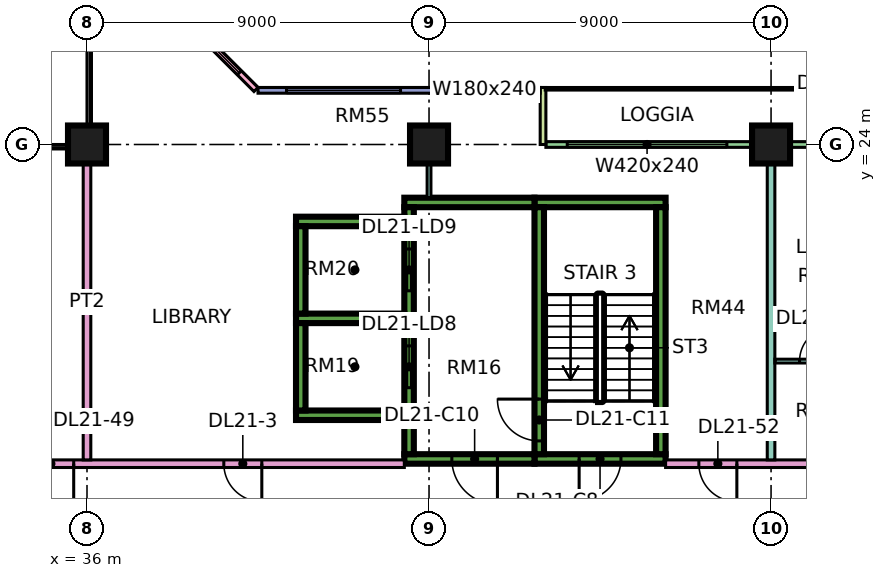
"""IFC4 building model, lengths in metres.
Left out: names, types, materials, properties, quantities, classifications, styles, units other than length and angle.
Written with IfcOpenShell. Run it as: python <this file> out.ifc"""

import sys

from ifc_helpers import new_model, si_unit, direction, frame, frame_2d, origin, origin_2d, place, context, subcontext, project, spatial, rectangle, extrude, element, fill, save


model = new_model("IFC4")
c1 = context("Model", 3, precision=1e-05, world=origin(), true_north=direction((0.0, 1.0)))
c2 = subcontext(c1, "Body", "Model", "MODEL_VIEW")
j1 = project(units=[si_unit("LENGTHUNIT", "METRE"), si_unit("PLANEANGLEUNIT", "RADIAN")], contexts=[c1])
p1 = place(None, origin())
s1 = spatial("IfcSite", under=j1, at=p1, CompositionType="ELEMENT")
p2 = place(p1, origin())
s2 = spatial("IfcBuilding", under=s1, at=p2, CompositionType="ELEMENT")
p3 = place(p2, frame((0.0, 0.0, 95.65)))
s3 = spatial("IfcBuildingStorey", under=s2, at=p3, CompositionType="ELEMENT", Elevation=95.65)
for number, where, z_axis, x_axis in (
    (1, (36.0, 24.0, 0.0), (0.0, 0.0, 1.0), (1.0, 0.0, 0.0)),
    (2, (45.0, 24.0, 0.0), (0.0, 0.0, 1.0), (1.0, 0.0, 0.0)),
    (3, (54.0, 24.0, 0.0), (0.0, 0.0, 1.0), (1.0, 0.0, 0.0)),
):
    element("IfcColumn", number, at=place(p3, frame(where, z_axis=z_axis, x_axis=x_axis)), inside=s3, PredefinedType="COLUMN", context=c2, shape_type="SweptSolid", body=[
        extrude(rectangle(XDim=1.0, YDim=1.0, at=origin_2d()), origin(), (0.0, 0.0, 1.0), 3.75),
    ])
p4 = place(p3, frame((47.775, 15.725, 0.0), z_axis=(0.0, 0.0, 1.0), x_axis=(1.0, 0.0, 0.0)))
e4 = element("IfcWall", 4, at=p4, inside=s3, PredefinedType="SHEAR", context=c2, shape_type="SweptSolid", body=[
    extrude(rectangle(XDim=3.45, YDim=0.25, at=frame_2d((1.725, 0.0))), origin(), (0.0, 0.0, 1.0), 3.75),
])
p5 = place(p4, frame((1.175, 0.0, 0.0)))
e5 = element("IfcOpeningElement", 5, at=p5, cuts=e4, PredefinedType="OPENING", context=c2, shape_type="SweptSolid", body=[
    extrude(rectangle(XDim=1.1, YDim=2.2, at=frame_2d((0.55, 1.1))), frame((0.0, 0.135, 0.0), z_axis=(0.0, -1.0, 0.0), x_axis=(1.0, 0.0, 0.0)), (0.0, 0.0, 1.0), 0.27),
])
p6 = place(p3, frame((47.775, 22.475, 0.0), z_axis=(0.0, 0.0, 1.0), x_axis=(1.0, 0.0, 0.0)))
e6 = element("IfcWall", 6, at=p6, inside=s3, PredefinedType="SHEAR", context=c2, shape_type="SweptSolid", body=[
    extrude(rectangle(XDim=3.45, YDim=0.25, at=frame_2d((1.725, 0.0))), origin(), (0.0, 0.0, 1.0), 3.75),
])
p7 = place(p3, frame((47.9, 15.85, 0.0), z_axis=(0.0, 0.0, 1.0), x_axis=(0.0, 1.0, 0.0)))
e7 = element("IfcWall", 7, at=p7, inside=s3, PredefinedType="SHEAR", context=c2, shape_type="SweptSolid", body=[
    extrude(rectangle(XDim=6.5, YDim=0.25, at=frame_2d((3.25, 0.0))), origin(), (0.0, 0.0, 1.0), 3.75),
])
p8 = place(p7, frame((0.35, 0.0, 0.0)))
e8 = element("IfcOpeningElement", 8, at=p8, cuts=e7, PredefinedType="OPENING", context=c2, shape_type="SweptSolid", body=[
    extrude(rectangle(XDim=1.1, YDim=2.2, at=frame_2d((0.55, 1.1))), frame((0.0, 0.135, 0.0), z_axis=(0.0, -1.0, 0.0), x_axis=(1.0, 0.0, 0.0)), (0.0, 0.0, 1.0), 0.27),
])
p9 = place(p3, frame((51.1, 15.85, 0.0), z_axis=(0.0, 0.0, 1.0), x_axis=(0.0, 1.0, 0.0)))
e9 = element("IfcWall", 9, at=p9, inside=s3, PredefinedType="SHEAR", context=c2, shape_type="SweptSolid", body=[
    extrude(rectangle(XDim=6.5, YDim=0.25, at=frame_2d((3.25, 0.0))), origin(), (0.0, 0.0, 1.0), 3.75),
])
p10 = place(p3, frame((44.35, 15.725, 0.0), z_axis=(0.0, 0.0, 1.0), x_axis=(1.0, 0.0, 0.0)))
e10 = element("IfcWall", 10, at=p10, inside=s3, PredefinedType="SHEAR", context=c2, shape_type="SweptSolid", body=[
    extrude(rectangle(XDim=3.425, YDim=0.25, at=frame_2d((1.712, 0.0))), origin(), (0.0, 0.0, 1.0), 3.75),
])
p11 = place(p10, frame((1.25, 0.0, 0.0)))
e11 = element("IfcOpeningElement", 11, at=p11, cuts=e10, PredefinedType="OPENING", context=c2, shape_type="SweptSolid", body=[
    extrude(rectangle(XDim=1.2, YDim=2.2, at=frame_2d((0.6, 1.1))), frame((0.0, 0.135, 0.0), z_axis=(0.0, -1.0, 0.0), x_axis=(1.0, 0.0, 0.0)), (0.0, 0.0, 1.0), 0.27),
])
p12 = place(p3, frame((44.35, 22.475, 0.0), z_axis=(0.0, 0.0, 1.0), x_axis=(1.0, 0.0, 0.0)))
e12 = element("IfcWall", 12, at=p12, inside=s3, PredefinedType="SHEAR", context=c2, shape_type="SweptSolid", body=[
    extrude(rectangle(XDim=3.425, YDim=0.25, at=frame_2d((1.712, 0.0))), origin(), (0.0, 0.0, 1.0), 3.75),
])
p13 = place(p3, frame((44.475, 15.85, 0.0), z_axis=(0.0, 0.0, 1.0), x_axis=(0.0, 1.0, 0.0)))
e13 = element("IfcWall", 13, at=p13, inside=s3, PredefinedType="SHEAR", context=c2, shape_type="SweptSolid", body=[
    extrude(rectangle(XDim=6.5, YDim=0.25, at=frame_2d((3.25, 0.0))), origin(), (0.0, 0.0, 1.0), 3.75),
])
p14 = place(p13, frame((1.75, 0.0, 0.0)))
e14 = element("IfcOpeningElement", 14, at=p14, cuts=e13, PredefinedType="OPENING", context=c2, shape_type="SweptSolid", body=[
    extrude(rectangle(XDim=1.1, YDim=2.2, at=frame_2d((0.55, 1.1))), frame((0.0, 0.135, 0.0), z_axis=(0.0, -1.0, 0.0), x_axis=(1.0, 0.0, 0.0)), (0.0, 0.0, 1.0), 0.27),
])
p15 = place(p13, frame((4.3, 0.0, 0.0)))
e15 = element("IfcOpeningElement", 15, at=p15, cuts=e13, PredefinedType="OPENING", context=c2, shape_type="SweptSolid", body=[
    extrude(rectangle(XDim=1.1, YDim=2.2, at=frame_2d((0.55, 1.1))), frame((0.0, 0.135, 0.0), z_axis=(0.0, -1.0, 0.0), x_axis=(1.0, 0.0, 0.0)), (0.0, 0.0, 1.0), 0.27),
])
for number, where, z_axis, x_axis in (
    (16, (41.5, 16.875, 0.0), (0.0, 0.0, 1.0), (1.0, 0.0, 0.0)),
    (17, (41.5, 19.425, 0.0), (0.0, 0.0, 1.0), (1.0, 0.0, 0.0)),
    (18, (41.5, 21.975, 0.0), (0.0, 0.0, 1.0), (1.0, 0.0, 0.0)),
):
    element("IfcWall", number, at=place(p3, frame(where, z_axis=z_axis, x_axis=x_axis)), inside=s3, PredefinedType="SHEAR", context=c2, shape_type="SweptSolid", body=[
        extrude(rectangle(XDim=2.85, YDim=0.25, at=frame_2d((1.425, 0.0))), origin(), (0.0, 0.0, 1.0), 3.75),
    ])
for number, where, z_axis, x_axis in (
    (19, (41.625, 17.0, 0.0), (0.0, 0.0, 1.0), (0.0, 1.0, 0.0)),
    (20, (41.625, 19.55, 0.0), (0.0, 0.0, 1.0), (0.0, 1.0, 0.0)),
):
    element("IfcWall", number, at=place(p3, frame(where, z_axis=z_axis, x_axis=x_axis)), inside=s3, PredefinedType="SHEAR", context=c2, shape_type="SweptSolid", body=[
        extrude(rectangle(XDim=2.3, YDim=0.25, at=frame_2d((1.15, 0.0))), origin(), (0.0, 0.0, 1.0), 3.75),
    ])
p16 = place(p3, frame((59.925, 24.0, 0.0), z_axis=(0.0, 0.0, 1.0), x_axis=(-1.0, 0.0, 0.0)))
e21 = element("IfcWall", 21, at=p16, inside=s3, PredefinedType="SOLIDWALL", context=c2, shape_type="SweptSolid", body=[
    extrude(rectangle(XDim=11.85, YDim=0.15, at=frame_2d((5.925, 0.0))), origin(), (0.0, 0.0, 1.0), 3.35),
])
p17 = place(p16, frame((0.562, 0.0, 0.45)))
e22 = element("IfcOpeningElement", 22, at=p17, cuts=e21, PredefinedType="OPENING", context=c2, shape_type="SweptSolid", body=[
    extrude(rectangle(XDim=1.8, YDim=2.4, at=frame_2d((0.9, 1.2))), frame((0.0, 0.085, 0.0), z_axis=(0.0, -1.0, 0.0), x_axis=(1.0, 0.0, 0.0)), (0.0, 0.0, 1.0), 0.17),
])
p18 = place(p16, frame((3.525, 0.0, 0.0)))
e23 = element("IfcOpeningElement", 23, at=p18, cuts=e21, PredefinedType="OPENING", context=c2, shape_type="SweptSolid", body=[
    extrude(rectangle(XDim=1.2, YDim=2.4, at=frame_2d((0.6, 1.2))), frame((0.0, 0.085, 0.0), z_axis=(0.0, -1.0, 0.0), x_axis=(1.0, 0.0, 0.0)), (0.0, 0.0, 1.0), 0.17),
])
p19 = place(p16, frame((7.087, 0.0, 0.45)))
e24 = element("IfcOpeningElement", 24, at=p19, cuts=e21, PredefinedType="OPENING", context=c2, shape_type="SweptSolid", body=[
    extrude(rectangle(XDim=4.2, YDim=2.4, at=frame_2d((2.1, 1.2))), frame((0.0, 0.085, 0.0), z_axis=(0.0, -1.0, 0.0), x_axis=(1.0, 0.0, 0.0)), (0.0, 0.0, 1.0), 0.17),
])
p20 = place(p3, frame((48.0, 25.5, 0.0), z_axis=(0.0, 0.0, 1.0), x_axis=(0.0, -1.0, 0.0)))
e25 = element("IfcWall", 25, at=p20, inside=s3, PredefinedType="SOLIDWALL", context=c2, shape_type="SweptSolid", body=[
    extrude(rectangle(XDim=1.5, YDim=0.15, at=frame_2d((0.75, 0.0))), origin(), (0.0, 0.0, 1.0), 3.35),
])
p21 = place(p3, frame((47.925, 25.425, 0.0), z_axis=(0.0, 0.0, 1.0), x_axis=(-1.0, 0.0, 0.0)))
e26 = element("IfcWall", 26, at=p21, inside=s3, PredefinedType="SOLIDWALL", context=c2, shape_type="SweptSolid", body=[
    extrude(rectangle(XDim=7.425, YDim=0.15, at=frame_2d((3.712, 0.0))), origin(), (0.0, 0.0, 1.0), 3.35),
])
p22 = place(p21, frame((0.562, 0.0, 0.45)))
e27 = element("IfcOpeningElement", 27, at=p22, cuts=e26, PredefinedType="OPENING", context=c2, shape_type="SweptSolid", body=[
    extrude(rectangle(XDim=1.8, YDim=2.4, at=frame_2d((0.9, 1.2))), frame((0.0, 0.085, 0.0), z_axis=(0.0, -1.0, 0.0), x_axis=(1.0, 0.0, 0.0)), (0.0, 0.0, 1.0), 0.17),
])
p23 = place(p21, frame((3.675, 0.0, 0.45)))
e28 = element("IfcOpeningElement", 28, at=p23, cuts=e26, PredefinedType="OPENING", context=c2, shape_type="SweptSolid", body=[
    extrude(rectangle(XDim=3.0, YDim=2.4, at=frame_2d((1.5, 1.2))), frame((0.0, 0.085, 0.0), z_axis=(0.0, -1.0, 0.0), x_axis=(1.0, 0.0, 0.0)), (0.0, 0.0, 1.0), 0.17),
])
p24 = place(p3, frame((40.447, 25.447, 0.0), z_axis=(0.0, 0.0, 1.0), x_axis=(-0.707106781187, 0.707106781187, 0.0)))
e29 = element("IfcWall", 29, at=p24, inside=s3, PredefinedType="SOLIDWALL", context=c2, shape_type="SweptSolid", body=[
    extrude(rectangle(XDim=4.243, YDim=0.15, at=frame_2d((2.121, 0.0))), origin(), (0.0, 0.0, 1.0), 3.35),
])
p25 = place(p24, frame((0.621, 0.0, 0.45)))
e30 = element("IfcOpeningElement", 30, at=p25, cuts=e29, PredefinedType="OPENING", context=c2, shape_type="SweptSolid", body=[
    extrude(rectangle(XDim=3.0, YDim=2.4, at=frame_2d((1.5, 1.2))), frame((0.0, 0.085, 0.0), z_axis=(0.0, -1.0, 0.0), x_axis=(1.0, 0.0, 0.0)), (0.0, 0.0, 1.0), 0.17),
])
p26 = place(p3, frame((34.0, 15.6, 0.0), z_axis=(0.0, 0.0, 1.0), x_axis=(1.0, 0.0, 0.0)))
e31 = element("IfcWall", 31, at=p26, inside=s3, PredefinedType="PARTITIONING", context=c2, shape_type="SweptSolid", body=[
    extrude(rectangle(XDim=10.35, YDim=0.2, at=frame_2d((5.175, 0.0))), origin(), (0.0, 0.0, 1.0), 3.35),
])
p27 = place(p26, frame((5.6, 0.0, 0.0)))
e32 = element("IfcOpeningElement", 32, at=p27, cuts=e31, PredefinedType="OPENING", context=c2, shape_type="SweptSolid", body=[
    extrude(rectangle(XDim=1.0, YDim=2.1, at=frame_2d((0.5, 1.05))), frame((0.0, 0.11, 0.0), z_axis=(0.0, -1.0, 0.0), x_axis=(1.0, 0.0, 0.0)), (0.0, 0.0, 1.0), 0.22),
])
p28 = place(p26, frame((0.45, 0.0, 0.0)))
e33 = element("IfcOpeningElement", 33, at=p28, cuts=e31, PredefinedType="OPENING", context=c2, shape_type="SweptSolid", body=[
    extrude(rectangle(XDim=1.2, YDim=2.1, at=frame_2d((0.6, 1.05))), frame((0.0, 0.11, 0.0), z_axis=(0.0, -1.0, 0.0), x_axis=(1.0, 0.0, 0.0)), (0.0, 0.0, 1.0), 0.22),
])
p29 = place(p3, frame((36.0, 15.7, 0.0), z_axis=(0.0, 0.0, 1.0), x_axis=(0.0, 1.0, 0.0)))
e34 = element("IfcWall", 34, at=p29, inside=s3, PredefinedType="PARTITIONING", context=c2, shape_type="SweptSolid", body=[
    extrude(rectangle(XDim=8.3, YDim=0.2, at=frame_2d((4.15, 0.0))), origin(), (0.0, 0.0, 1.0), 3.35),
])
p30 = place(p3, frame((45.0, 22.6, 0.0), z_axis=(0.0, 0.0, 1.0), x_axis=(0.0, 1.0, 0.0)))
e35 = element("IfcWall", 35, at=p30, inside=s3, PredefinedType="PARTITIONING", context=c2, shape_type="SweptSolid", body=[
    extrude(rectangle(XDim=1.4, YDim=0.1, at=frame_2d((0.7, 0.0))), origin(), (0.0, 0.0, 1.0), 3.35),
])
p31 = place(p3, frame((51.225, 15.6, 0.0), z_axis=(0.0, 0.0, 1.0), x_axis=(1.0, 0.0, 0.0)))
e36 = element("IfcWall", 36, at=p31, inside=s3, PredefinedType="PARTITIONING", context=c2, shape_type="SweptSolid", body=[
    extrude(rectangle(XDim=22.125, YDim=0.2, at=frame_2d((11.062, 0.0))), origin(), (0.0, 0.0, 1.0), 3.35),
])
p32 = place(p31, frame((6.125, 0.0, 0.0)))
e37 = element("IfcOpeningElement", 37, at=p32, cuts=e36, PredefinedType="OPENING", context=c2, shape_type="SweptSolid", body=[
    extrude(rectangle(XDim=1.0, YDim=2.1, at=frame_2d((0.5, 1.05))), frame((0.0, 0.11, 0.0), z_axis=(0.0, -1.0, 0.0), x_axis=(1.0, 0.0, 0.0)), (0.0, 0.0, 1.0), 0.22),
])
p33 = place(p31, frame((0.875, 0.0, 0.0)))
e38 = element("IfcOpeningElement", 38, at=p33, cuts=e36, PredefinedType="OPENING", context=c2, shape_type="SweptSolid", body=[
    extrude(rectangle(XDim=1.0, YDim=2.1, at=frame_2d((0.5, 1.05))), frame((0.0, 0.11, 0.0), z_axis=(0.0, -1.0, 0.0), x_axis=(1.0, 0.0, 0.0)), (0.0, 0.0, 1.0), 0.22),
])
p34 = place(p3, frame((54.0, 15.7, 0.0), z_axis=(0.0, 0.0, 1.0), x_axis=(0.0, 1.0, 0.0)))
e39 = element("IfcWall", 39, at=p34, inside=s3, PredefinedType="PARTITIONING", context=c2, shape_type="SweptSolid", body=[
    extrude(rectangle(XDim=8.226, YDim=0.2, at=frame_2d((4.113, 0.0))), origin(), (0.0, 0.0, 1.0), 3.35),
])
p35 = place(p3, frame((54.1, 18.3, 0.0), z_axis=(0.0, 0.0, 1.0), x_axis=(1.0, 0.0, 0.0)))
e40 = element("IfcWall", 40, at=p35, inside=s3, PredefinedType="PARTITIONING", context=c2, shape_type="SweptSolid", body=[
    extrude(rectangle(XDim=2.25, YDim=0.1, at=frame_2d((1.125, 0.0))), origin(), (0.0, 0.0, 1.0), 3.35),
])
p36 = place(p35, frame((0.65, 0.0, 0.0)))
e41 = element("IfcOpeningElement", 41, at=p36, cuts=e40, PredefinedType="OPENING", context=c2, shape_type="SweptSolid", body=[
    extrude(rectangle(XDim=0.9, YDim=2.1, at=frame_2d((0.45, 1.05))), frame((0.0, 0.06, 0.0), z_axis=(0.0, -1.0, 0.0), x_axis=(1.0, 0.0, 0.0)), (0.0, 0.0, 1.0), 0.12),
])
p37 = place(p19, origin())
e42 = element("IfcWindow", 42, at=p37, inside=s3, PartitioningType="SINGLE_PANEL", PredefinedType="WINDOW", context=c2, shape_type="SweptSolid", body=[
    extrude(rectangle(XDim=4.2, YDim=2.4, at=frame_2d((2.1, 1.2))), frame((0.0, 0.03, 0.0), z_axis=(0.0, -1.0, 0.0), x_axis=(1.0, 0.0, 0.0)), (0.0, 0.0, 1.0), 0.06),
])
fill(e24, e42)
p38 = place(p22, origin())
e43 = element("IfcWindow", 43, at=p38, inside=s3, PartitioningType="SINGLE_PANEL", PredefinedType="WINDOW", context=c2, shape_type="SweptSolid", body=[
    extrude(rectangle(XDim=1.8, YDim=2.4, at=frame_2d((0.9, 1.2))), frame((0.0, 0.03, 0.0), z_axis=(0.0, -1.0, 0.0), x_axis=(1.0, 0.0, 0.0)), (0.0, 0.0, 1.0), 0.06),
])
fill(e27, e43)
p39 = place(p23, origin())
e44 = element("IfcWindow", 44, at=p39, inside=s3, PartitioningType="SINGLE_PANEL", PredefinedType="WINDOW", context=c2, shape_type="SweptSolid", body=[
    extrude(rectangle(XDim=3.0, YDim=2.4, at=frame_2d((1.5, 1.2))), frame((0.0, 0.03, 0.0), z_axis=(0.0, -1.0, 0.0), x_axis=(1.0, 0.0, 0.0)), (0.0, 0.0, 1.0), 0.06),
])
fill(e28, e44)
p40 = place(p25, origin())
e45 = element("IfcWindow", 45, at=p40, inside=s3, PartitioningType="SINGLE_PANEL", PredefinedType="WINDOW", context=c2, shape_type="SweptSolid", body=[
    extrude(rectangle(XDim=3.0, YDim=2.4, at=frame_2d((1.5, 1.2))), frame((0.0, 0.03, 0.0), z_axis=(0.0, -1.0, 0.0), x_axis=(1.0, 0.0, 0.0)), (0.0, 0.0, 1.0), 0.06),
])
fill(e30, e45)
p41 = place(p5, frame((1.1, 0.0, 0.0), z_axis=(0.0, 0.0, 1.0), x_axis=(-1.0, 0.0, 0.0)))
e46 = element("IfcDoor", 46, at=p41, inside=s3, OperationType="SINGLE_SWING_LEFT", PredefinedType="DOOR", context=c2, shape_type="SweptSolid", body=[
    extrude(rectangle(XDim=1.1, YDim=2.2, at=frame_2d((0.55, 1.1))), frame((0.0, 0.025, 0.0), z_axis=(0.0, -1.0, 0.0), x_axis=(1.0, 0.0, 0.0)), (0.0, 0.0, 1.0), 0.05),
])
fill(e5, e46)
p42 = place(p11, origin())
e47 = element("IfcDoor", 47, at=p42, inside=s3, OperationType="SINGLE_SWING_RIGHT", PredefinedType="DOOR", context=c2, shape_type="SweptSolid", body=[
    extrude(rectangle(XDim=1.2, YDim=2.2, at=frame_2d((0.6, 1.1))), frame((0.0, 0.025, 0.0), z_axis=(0.0, -1.0, 0.0), x_axis=(1.0, 0.0, 0.0)), (0.0, 0.0, 1.0), 0.05),
])
fill(e11, e47)
p43 = place(p8, frame((1.1, 0.0, 0.0), z_axis=(0.0, 0.0, 1.0), x_axis=(-1.0, 0.0, 0.0)))
e48 = element("IfcDoor", 48, at=p43, inside=s3, OperationType="SINGLE_SWING_RIGHT", PredefinedType="DOOR", context=c2, shape_type="SweptSolid", body=[
    extrude(rectangle(XDim=1.1, YDim=2.2, at=frame_2d((0.55, 1.1))), frame((0.0, 0.025, 0.0), z_axis=(0.0, -1.0, 0.0), x_axis=(1.0, 0.0, 0.0)), (0.0, 0.0, 1.0), 0.05),
])
fill(e8, e48)
p44 = place(p14, origin())
e49 = element("IfcDoor", 49, at=p44, inside=s3, OperationType="DOUBLE_DOOR_SLIDING", PredefinedType="DOOR", context=c2, shape_type="SweptSolid", body=[
    extrude(rectangle(XDim=1.1, YDim=2.2, at=frame_2d((0.55, 1.1))), frame((0.0, 0.025, 0.0), z_axis=(0.0, -1.0, 0.0), x_axis=(1.0, 0.0, 0.0)), (0.0, 0.0, 1.0), 0.05),
])
fill(e14, e49)
p45 = place(p15, origin())
e50 = element("IfcDoor", 50, at=p45, inside=s3, OperationType="DOUBLE_DOOR_SLIDING", PredefinedType="DOOR", context=c2, shape_type="SweptSolid", body=[
    extrude(rectangle(XDim=1.1, YDim=2.2, at=frame_2d((0.55, 1.1))), frame((0.0, 0.025, 0.0), z_axis=(0.0, -1.0, 0.0), x_axis=(1.0, 0.0, 0.0)), (0.0, 0.0, 1.0), 0.05),
])
fill(e15, e50)
p46 = place(p27, origin())
e51 = element("IfcDoor", 51, at=p46, inside=s3, OperationType="SINGLE_SWING_RIGHT", PredefinedType="DOOR", context=c2, shape_type="SweptSolid", body=[
    extrude(rectangle(XDim=1.0, YDim=2.1, at=frame_2d((0.5, 1.05))), frame((0.0, 0.025, 0.0), z_axis=(0.0, -1.0, 0.0), x_axis=(1.0, 0.0, 0.0)), (0.0, 0.0, 1.0), 0.05),
])
fill(e32, e51)
p47 = place(p36, frame((0.9, 0.0, 0.0), z_axis=(0.0, 0.0, 1.0), x_axis=(-1.0, 0.0, 0.0)))
e52 = element("IfcDoor", 52, at=p47, inside=s3, OperationType="SINGLE_SWING_RIGHT", PredefinedType="DOOR", context=c2, shape_type="SweptSolid", body=[
    extrude(rectangle(XDim=0.9, YDim=2.1, at=frame_2d((0.45, 1.05))), frame((0.0, 0.025, 0.0), z_axis=(0.0, -1.0, 0.0), x_axis=(1.0, 0.0, 0.0)), (0.0, 0.0, 1.0), 0.05),
])
fill(e41, e52)
p48 = place(p28, origin())
e53 = element("IfcDoor", 53, at=p48, inside=s3, OperationType="SINGLE_SWING_RIGHT", PredefinedType="DOOR", context=c2, shape_type="SweptSolid", body=[
    extrude(rectangle(XDim=1.2, YDim=2.1, at=frame_2d((0.6, 1.05))), frame((0.0, 0.025, 0.0), z_axis=(0.0, -1.0, 0.0), x_axis=(1.0, 0.0, 0.0)), (0.0, 0.0, 1.0), 0.05),
])
fill(e33, e53)
p49 = place(p33, origin())
e54 = element("IfcDoor", 54, at=p49, inside=s3, OperationType="SINGLE_SWING_RIGHT", PredefinedType="DOOR", context=c2, shape_type="SweptSolid", body=[
    extrude(rectangle(XDim=1.0, YDim=2.1, at=frame_2d((0.5, 1.05))), frame((0.0, 0.025, 0.0), z_axis=(0.0, -1.0, 0.0), x_axis=(1.0, 0.0, 0.0)), (0.0, 0.0, 1.0), 0.05),
])
fill(e38, e54)
save(model, sys.argv[1])
